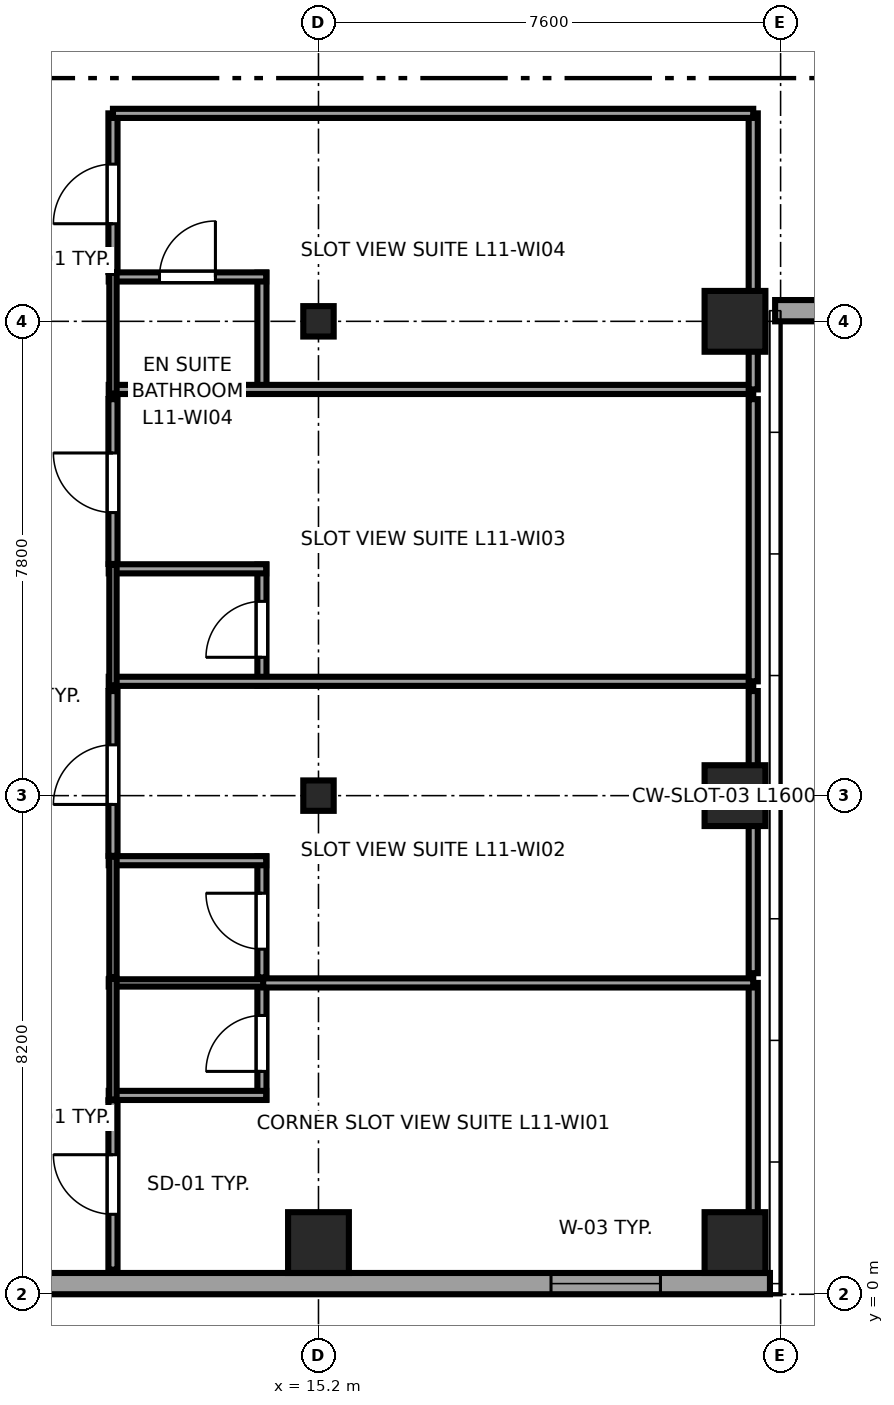
"""IFC4 building model, lengths in metres.
Left out: names, types, materials, properties, quantities, classifications, styles, units other than length and angle.
Written with IfcOpenShell. Run it as: python <this file> out.ifc"""

import sys

from ifc_helpers import new_model, si_unit, direction, frame, frame_2d, origin, origin_2d, place, context, subcontext, project, spatial, rectangle, i_section, extrude, source, transform, mapped, element, fill, save


model = new_model("IFC4")
c1 = context("Model", 3, precision=1e-05, world=origin(), true_north=direction((0.0, 1.0)))
c2 = subcontext(c1, "Body", "Model", "MODEL_VIEW")
j1 = project(units=[si_unit("LENGTHUNIT", "METRE"), si_unit("PLANEANGLEUNIT", "RADIAN")], contexts=[c1])
p1 = place(None, origin())
s1 = spatial("IfcSite", under=j1, at=p1, CompositionType="ELEMENT")
p2 = place(p1, origin())
s2 = spatial("IfcBuilding", under=s1, at=p2, CompositionType="ELEMENT")
p3 = place(p2, frame((0.0, 0.0, 49.75)))
s3 = spatial("IfcBuildingStorey", under=s2, at=p3, CompositionType="ELEMENT", Elevation=49.75)
m1 = source(origin(), c2, "Body", "SweptSolid", [
    extrude(rectangle(XDim=1.0, YDim=1.0, at=origin_2d()), origin(), (0.0, 0.0, 1.0), 3.55),
])
p4 = place(p3, frame((15.2, 0.85, 0.0), z_axis=(0.0, 0.0, 1.0), x_axis=(1.0, 0.0, 0.0)))
e1 = element("IfcColumn", 1, at=p4, inside=s3, PredefinedType="COLUMN", context=c2, shape_type="MappedRepresentation", body=[
    mapped(m1, transform((0.0, 0.0, 0.0), x_axis=(1.0, 0.0, 0.0), y_axis=(0.0, 1.0, 0.0), z_axis=(0.0, 0.0, 1.0), scale=1.0)),
])
m2 = source(origin(), c2, "Body", "SweptSolid", [
    extrude(i_section(OverallWidth=0.5, OverallDepth=0.5, WebThickness=0.028, FlangeThickness=0.045, at=origin_2d()), origin(), (0.0, 0.0, 1.0), 3.55),
])
for number, where, z_axis, x_axis in (
    (2, (15.2, 8.2, 0.0), (0.0, 0.0, 1.0), (1.0, 0.0, 0.0)),
    (3, (15.2, 16.0, 0.0), (0.0, 0.0, 1.0), (1.0, 0.0, 0.0)),
):
    element("IfcColumn", number, at=place(p3, frame(where, z_axis=z_axis, x_axis=x_axis)), inside=s3, PredefinedType="COLUMN", context=c2, shape_type="MappedRepresentation", body=[
        mapped(m2, transform((0.0, 0.0, 0.0), x_axis=(1.0, 0.0, 0.0), y_axis=(0.0, 1.0, 0.0), z_axis=(0.0, 0.0, 1.0), scale=1.0)),
    ])
for number, where, z_axis, x_axis in (
    (4, (22.05, 0.85, 0.0), (0.0, 0.0, 1.0), (1.0, 0.0, 0.0)),
    (5, (22.05, 8.2, 0.0), (0.0, 0.0, 1.0), (1.0, 0.0, 0.0)),
    (6, (22.05, 16.0, 0.0), (0.0, 0.0, 1.0), (1.0, 0.0, 0.0)),
):
    element("IfcColumn", number, at=place(p3, frame(where, z_axis=z_axis, x_axis=x_axis)), inside=s3, PredefinedType="COLUMN", context=c2, shape_type="MappedRepresentation", body=[
        mapped(m1, transform((0.0, 0.0, 0.0), x_axis=(1.0, 0.0, 0.0), y_axis=(0.0, 1.0, 0.0), z_axis=(0.0, 0.0, 1.0), scale=1.0)),
    ])
p5 = place(p3, frame((4.617, 0.175, 0.0), z_axis=(0.0, 0.0, 1.0), x_axis=(1.0, 0.0, 0.0)))
e7 = element("IfcWall", 7, at=p5, inside=s3, PredefinedType="SOLIDWALL", context=c2, shape_type="SweptSolid", body=[
    extrude(rectangle(XDim=18.008, YDim=0.35, at=frame_2d((9.004, 0.0))), origin(), (0.0, 0.0, 1.0), 3.37),
])
p6 = place(p5, frame((14.407, 0.0, 0.68)))
e8 = element("IfcOpeningElement", 8, at=p6, cuts=e7, PredefinedType="OPENING", context=c2, shape_type="SweptSolid", body=[
    extrude(rectangle(XDim=1.8, YDim=1.85, at=frame_2d((0.9, 0.925))), frame((0.0, 0.185, 0.0), z_axis=(0.0, -1.0, 0.0), x_axis=(1.0, 0.0, 0.0)), (0.0, 0.0, 1.0), 0.37),
])
p7 = place(p3, frame((22.71, 16.175, 0.0), z_axis=(0.0, 0.0, 1.0), x_axis=(1.0, 0.0, 0.0)))
e9 = element("IfcWall", 9, at=p7, inside=s3, PredefinedType="SOLIDWALL", context=c2, shape_type="SweptSolid", body=[
    extrude(rectangle(XDim=11.58, YDim=0.35, at=frame_2d((5.79, 0.0))), origin(), (0.0, 0.0, 1.0), 2.748),
])
p8 = place(p7, frame((2.295, 0.0, 0.68)))
e10 = element("IfcOpeningElement", 10, at=p8, cuts=e9, PredefinedType="OPENING", context=c2, shape_type="SweptSolid", body=[
    extrude(rectangle(XDim=1.8, YDim=1.85, at=frame_2d((0.9, 0.925))), frame((0.0, 0.185, 0.0), z_axis=(0.0, -1.0, 0.0), x_axis=(1.0, 0.0, 0.0)), (0.0, 0.0, 1.0), 0.37),
])
p9 = place(p7, frame((7.485, 0.0, 0.68)))
e11 = element("IfcOpeningElement", 11, at=p9, cuts=e9, PredefinedType="OPENING", context=c2, shape_type="SweptSolid", body=[
    extrude(rectangle(XDim=1.8, YDim=1.85, at=frame_2d((0.9, 0.925))), frame((0.0, 0.185, 0.0), z_axis=(0.0, -1.0, 0.0), x_axis=(1.0, 0.0, 0.0)), (0.0, 0.0, 1.0), 0.37),
])
p10 = place(p3, frame((14.27, 3.2, 0.0), z_axis=(0.0, 0.0, 1.0), x_axis=(0.0, 1.0, 0.0)))
e12 = element("IfcWall", 12, at=p10, inside=s3, PredefinedType="PARTITIONING", context=c2, shape_type="SweptSolid", body=[
    extrude(rectangle(XDim=1.99, YDim=0.15, at=frame_2d((0.995, 0.0))), origin(), (0.0, 0.0, 1.0), 3.37),
])
p11 = place(p10, frame((0.465, 0.0, 0.0)))
e13 = element("IfcOpeningElement", 13, at=p11, cuts=e12, PredefinedType="OPENING", context=c2, shape_type="SweptSolid", body=[
    extrude(rectangle(XDim=0.92, YDim=2.01, at=frame_2d((0.46, 1.005))), frame((0.0, 0.085, 0.0), z_axis=(0.0, -1.0, 0.0), x_axis=(1.0, 0.0, 0.0)), (0.0, 0.0, 1.0), 0.17),
])
p12 = place(p3, frame((11.75, 3.27, 0.0), z_axis=(0.0, 0.0, 1.0), x_axis=(1.0, 0.0, 0.0)))
e14 = element("IfcWall", 14, at=p12, inside=s3, PredefinedType="PARTITIONING", context=c2, shape_type="SweptSolid", body=[
    extrude(rectangle(XDim=2.59, YDim=0.15, at=frame_2d((1.295, 0.0))), origin(), (0.0, 0.0, 1.0), 3.37),
])
p13 = place(p3, frame((11.75, 5.12, 0.0), z_axis=(0.0, 0.0, 1.0), x_axis=(1.0, 0.0, 0.0)))
e15 = element("IfcWall", 15, at=p13, inside=s3, PredefinedType="PLUMBINGWALL", context=c2, shape_type="SweptSolid", body=[
    extrude(rectangle(XDim=2.59, YDim=0.12, at=frame_2d((1.295, 0.0))), origin(), (0.0, 0.0, 1.0), 3.37),
])
p14 = place(p3, frame((11.82, 3.2, 0.0), z_axis=(0.0, 0.0, 1.0), x_axis=(0.0, 1.0, 0.0)))
e16 = element("IfcWall", 16, at=p14, inside=s3, PredefinedType="PLUMBINGWALL", context=c2, shape_type="SweptSolid", body=[
    extrude(rectangle(XDim=1.99, YDim=0.12, at=frame_2d((0.995, 0.0))), origin(), (0.0, 0.0, 1.0), 3.37),
])
p15 = place(p3, frame((14.27, 5.21, 0.0), z_axis=(0.0, 0.0, 1.0), x_axis=(0.0, 1.0, 0.0)))
e17 = element("IfcWall", 17, at=p15, inside=s3, PredefinedType="PARTITIONING", context=c2, shape_type="SweptSolid", body=[
    extrude(rectangle(XDim=1.99, YDim=0.15, at=frame_2d((0.995, 0.0))), origin(), (0.0, 0.0, 1.0), 3.37),
])
p16 = place(p15, frame((0.465, 0.0, 0.0)))
e18 = element("IfcOpeningElement", 18, at=p16, cuts=e17, PredefinedType="OPENING", context=c2, shape_type="SweptSolid", body=[
    extrude(rectangle(XDim=0.92, YDim=2.01, at=frame_2d((0.46, 1.005))), frame((0.0, 0.085, 0.0), z_axis=(0.0, -1.0, 0.0), x_axis=(1.0, 0.0, 0.0)), (0.0, 0.0, 1.0), 0.17),
])
p17 = place(p3, frame((11.75, 7.13, 0.0), z_axis=(0.0, 0.0, 1.0), x_axis=(1.0, 0.0, 0.0)))
e19 = element("IfcWall", 19, at=p17, inside=s3, PredefinedType="PARTITIONING", context=c2, shape_type="SweptSolid", body=[
    extrude(rectangle(XDim=2.59, YDim=0.15, at=frame_2d((1.295, 0.0))), origin(), (0.0, 0.0, 1.0), 3.37),
])
p18 = place(p3, frame((11.82, 5.21, 0.0), z_axis=(0.0, 0.0, 1.0), x_axis=(0.0, 1.0, 0.0)))
e20 = element("IfcWall", 20, at=p18, inside=s3, PredefinedType="PLUMBINGWALL", context=c2, shape_type="SweptSolid", body=[
    extrude(rectangle(XDim=1.99, YDim=0.12, at=frame_2d((0.995, 0.0))), origin(), (0.0, 0.0, 1.0), 3.37),
])
p19 = place(p3, frame((14.27, 10.01, 0.0), z_axis=(0.0, 0.0, 1.0), x_axis=(0.0, 1.0, 0.0)))
e21 = element("IfcWall", 21, at=p19, inside=s3, PredefinedType="PARTITIONING", context=c2, shape_type="SweptSolid", body=[
    extrude(rectangle(XDim=1.99, YDim=0.15, at=frame_2d((0.995, 0.0))), origin(), (0.0, 0.0, 1.0), 3.37),
])
p20 = place(p19, frame((0.465, 0.0, 0.0)))
e22 = element("IfcOpeningElement", 22, at=p20, cuts=e21, PredefinedType="OPENING", context=c2, shape_type="SweptSolid", body=[
    extrude(rectangle(XDim=0.92, YDim=2.01, at=frame_2d((0.46, 1.005))), frame((0.0, 0.085, 0.0), z_axis=(0.0, -1.0, 0.0), x_axis=(1.0, 0.0, 0.0)), (0.0, 0.0, 1.0), 0.17),
])
p21 = place(p3, frame((11.75, 10.08, 0.0), z_axis=(0.0, 0.0, 1.0), x_axis=(1.0, 0.0, 0.0)))
e23 = element("IfcWall", 23, at=p21, inside=s3, PredefinedType="PARTITIONING", context=c2, shape_type="SweptSolid", body=[
    extrude(rectangle(XDim=10.6, YDim=0.15, at=frame_2d((5.3, 0.0))), origin(), (0.0, 0.0, 1.0), 3.37),
])
p22 = place(p3, frame((11.75, 11.93, 0.0), z_axis=(0.0, 0.0, 1.0), x_axis=(1.0, 0.0, 0.0)))
e24 = element("IfcWall", 24, at=p22, inside=s3, PredefinedType="PARTITIONING", context=c2, shape_type="SweptSolid", body=[
    extrude(rectangle(XDim=2.59, YDim=0.15, at=frame_2d((1.295, 0.0))), origin(), (0.0, 0.0, 1.0), 3.37),
])
p23 = place(p3, frame((11.82, 10.01, 0.0), z_axis=(0.0, 0.0, 1.0), x_axis=(0.0, 1.0, 0.0)))
e25 = element("IfcWall", 25, at=p23, inside=s3, PredefinedType="PLUMBINGWALL", context=c2, shape_type="SweptSolid", body=[
    extrude(rectangle(XDim=1.99, YDim=0.12, at=frame_2d((0.995, 0.0))), origin(), (0.0, 0.0, 1.0), 3.37),
])
p24 = place(p3, frame((14.27, 14.81, 0.0), z_axis=(0.0, 0.0, 1.0), x_axis=(0.0, 1.0, 0.0)))
e26 = element("IfcWall", 26, at=p24, inside=s3, PredefinedType="PARTITIONING", context=c2, shape_type="SweptSolid", body=[
    extrude(rectangle(XDim=1.99, YDim=0.15, at=frame_2d((0.995, 0.0))), origin(), (0.0, 0.0, 1.0), 3.37),
])
p25 = place(p3, frame((11.75, 14.88, 0.0), z_axis=(0.0, 0.0, 1.0), x_axis=(1.0, 0.0, 0.0)))
e27 = element("IfcWall", 27, at=p25, inside=s3, PredefinedType="PARTITIONING", context=c2, shape_type="SweptSolid", body=[
    extrude(rectangle(XDim=10.6, YDim=0.15, at=frame_2d((5.3, 0.0))), origin(), (0.0, 0.0, 1.0), 3.37),
])
p26 = place(p3, frame((11.75, 16.73, 0.0), z_axis=(0.0, 0.0, 1.0), x_axis=(1.0, 0.0, 0.0)))
e28 = element("IfcWall", 28, at=p26, inside=s3, PredefinedType="PARTITIONING", context=c2, shape_type="SweptSolid", body=[
    extrude(rectangle(XDim=2.59, YDim=0.15, at=frame_2d((1.295, 0.0))), origin(), (0.0, 0.0, 1.0), 3.37),
])
p27 = place(p26, frame((0.835, 0.0, 0.0)))
e29 = element("IfcOpeningElement", 29, at=p27, cuts=e28, PredefinedType="OPENING", context=c2, shape_type="SweptSolid", body=[
    extrude(rectangle(XDim=0.92, YDim=2.01, at=frame_2d((0.46, 1.005))), frame((0.0, 0.085, 0.0), z_axis=(0.0, -1.0, 0.0), x_axis=(1.0, 0.0, 0.0)), (0.0, 0.0, 1.0), 0.17),
])
p28 = place(p3, frame((11.82, 14.81, 0.0), z_axis=(0.0, 0.0, 1.0), x_axis=(0.0, 1.0, 0.0)))
e30 = element("IfcWall", 30, at=p28, inside=s3, PredefinedType="PLUMBINGWALL", context=c2, shape_type="SweptSolid", body=[
    extrude(rectangle(XDim=1.99, YDim=0.12, at=frame_2d((0.995, 0.0))), origin(), (0.0, 0.0, 1.0), 3.37),
])
p29 = place(p3, frame((11.82, 0.405, 0.0), z_axis=(0.0, 0.0, 1.0), x_axis=(0.0, 1.0, 0.0)))
e31 = element("IfcWall", 31, at=p29, inside=s3, PredefinedType="PARTITIONING", context=c2, shape_type="SweptSolid", body=[
    extrude(rectangle(XDim=2.785, YDim=0.15, at=frame_2d((1.393, 0.0))), origin(), (0.0, 0.0, 1.0), 3.37),
])
p30 = place(p29, frame((0.91, 0.0, 0.0)))
e32 = element("IfcOpeningElement", 32, at=p30, cuts=e31, PredefinedType="OPENING", context=c2, shape_type="SweptSolid", body=[
    extrude(rectangle(XDim=0.98, YDim=2.12, at=frame_2d((0.49, 1.06))), frame((0.0, 0.085, 0.0), z_axis=(0.0, -1.0, 0.0), x_axis=(1.0, 0.0, 0.0)), (0.0, 0.0, 1.0), 0.17),
])
p31 = place(p3, frame((22.35, 0.405, 0.0), z_axis=(0.0, 0.0, 1.0), x_axis=(0.0, 1.0, 0.0)))
e33 = element("IfcWall", 33, at=p31, inside=s3, PredefinedType="PARTITIONING", context=c2, shape_type="SweptSolid", body=[
    extrude(rectangle(XDim=4.715, YDim=0.15, at=frame_2d((2.357, 0.0))), origin(), (0.0, 0.0, 1.0), 3.37),
])
p32 = place(p3, frame((14.29, 5.12, 0.0), z_axis=(0.0, 0.0, 1.0), x_axis=(1.0, 0.0, 0.0)))
e34 = element("IfcWall", 34, at=p32, inside=s3, PredefinedType="PARTITIONING", context=c2, shape_type="SweptSolid", body=[
    extrude(rectangle(XDim=8.06, YDim=0.15, at=frame_2d((4.03, 0.0))), origin(), (0.0, 0.0, 1.0), 3.37),
])
p33 = place(p3, frame((11.82, 7.21, 0.0), z_axis=(0.0, 0.0, 1.0), x_axis=(0.0, 1.0, 0.0)))
e35 = element("IfcWall", 35, at=p33, inside=s3, PredefinedType="PARTITIONING", context=c2, shape_type="SweptSolid", body=[
    extrude(rectangle(XDim=2.71, YDim=0.15, at=frame_2d((1.355, 0.0))), origin(), (0.0, 0.0, 1.0), 3.37),
])
p34 = place(p33, frame((0.845, 0.0, 0.0)))
e36 = element("IfcOpeningElement", 36, at=p34, cuts=e35, PredefinedType="OPENING", context=c2, shape_type="SweptSolid", body=[
    extrude(rectangle(XDim=0.98, YDim=2.12, at=frame_2d((0.49, 1.06))), frame((0.0, 0.085, 0.0), z_axis=(0.0, -1.0, 0.0), x_axis=(1.0, 0.0, 0.0)), (0.0, 0.0, 1.0), 0.17),
])
p35 = place(p3, frame((22.35, 5.28, 0.0), z_axis=(0.0, 0.0, 1.0), x_axis=(0.0, 1.0, 0.0)))
e37 = element("IfcWall", 37, at=p35, inside=s3, PredefinedType="PARTITIONING", context=c2, shape_type="SweptSolid", body=[
    extrude(rectangle(XDim=4.64, YDim=0.15, at=frame_2d((2.32, 0.0))), origin(), (0.0, 0.0, 1.0), 3.37),
])
p36 = place(p3, frame((11.82, 12.01, 0.0), z_axis=(0.0, 0.0, 1.0), x_axis=(0.0, 1.0, 0.0)))
e38 = element("IfcWall", 38, at=p36, inside=s3, PredefinedType="PARTITIONING", context=c2, shape_type="SweptSolid", body=[
    extrude(rectangle(XDim=2.71, YDim=0.15, at=frame_2d((1.355, 0.0))), origin(), (0.0, 0.0, 1.0), 3.37),
])
p37 = place(p36, frame((0.845, 0.0, 0.0)))
e39 = element("IfcOpeningElement", 39, at=p37, cuts=e38, PredefinedType="OPENING", context=c2, shape_type="SweptSolid", body=[
    extrude(rectangle(XDim=0.98, YDim=2.12, at=frame_2d((0.49, 1.06))), frame((0.0, 0.085, 0.0), z_axis=(0.0, -1.0, 0.0), x_axis=(1.0, 0.0, 0.0)), (0.0, 0.0, 1.0), 0.17),
])
p38 = place(p3, frame((22.35, 10.08, 0.0), z_axis=(0.0, 0.0, 1.0), x_axis=(0.0, 1.0, 0.0)))
e40 = element("IfcWall", 40, at=p38, inside=s3, PredefinedType="PARTITIONING", context=c2, shape_type="SweptSolid", body=[
    extrude(rectangle(XDim=4.64, YDim=0.15, at=frame_2d((2.32, 0.0))), origin(), (0.0, 0.0, 1.0), 3.37),
])
p39 = place(p3, frame((11.82, 16.81, 0.0), z_axis=(0.0, 0.0, 1.0), x_axis=(0.0, 1.0, 0.0)))
e41 = element("IfcWall", 41, at=p39, inside=s3, PredefinedType="PARTITIONING", context=c2, shape_type="SweptSolid", body=[
    extrude(rectangle(XDim=2.61, YDim=0.15, at=frame_2d((1.305, 0.0))), origin(), (0.0, 0.0, 1.0), 3.37),
])
p40 = place(p39, frame((0.795, 0.0, 0.0)))
e42 = element("IfcOpeningElement", 42, at=p40, cuts=e41, PredefinedType="OPENING", context=c2, shape_type="SweptSolid", body=[
    extrude(rectangle(XDim=0.98, YDim=2.12, at=frame_2d((0.49, 1.06))), frame((0.0, 0.085, 0.0), z_axis=(0.0, -1.0, 0.0), x_axis=(1.0, 0.0, 0.0)), (0.0, 0.0, 1.0), 0.17),
])
p41 = place(p3, frame((22.35, 14.88, 0.0), z_axis=(0.0, 0.0, 1.0), x_axis=(0.0, 1.0, 0.0)))
e43 = element("IfcWall", 43, at=p41, inside=s3, PredefinedType="PARTITIONING", context=c2, shape_type="SweptSolid", body=[
    extrude(rectangle(XDim=4.54, YDim=0.15, at=frame_2d((2.27, 0.0))), origin(), (0.0, 0.0, 1.0), 3.37),
])
p42 = place(p3, frame((11.82, 19.42, 0.0), z_axis=(0.0, 0.0, 1.0), x_axis=(1.0, 0.0, 0.0)))
e44 = element("IfcWall", 44, at=p42, inside=s3, PredefinedType="PARTITIONING", context=c2, shape_type="SweptSolid", body=[
    extrude(rectangle(XDim=10.53, YDim=0.15, at=frame_2d((5.265, 0.0))), origin(), (0.0, 0.0, 1.0), 3.37),
])
m3 = source(origin(), c2, "Body", "SweptSolid", [
    extrude(rectangle(XDim=1.8, YDim=1.85, at=frame_2d((0.9, 0.925))), frame((0.0, 0.09, 0.0), z_axis=(0.0, -1.0, 0.0), x_axis=(1.0, 0.0, 0.0)), (0.0, 0.0, 1.0), 0.06),
])
p43 = place(p6, origin())
e45 = element("IfcWindow", 45, at=p43, inside=s3, PartitioningType="TRIPLE_PANEL_HORIZONTAL", PredefinedType="WINDOW", context=c2, shape_type="MappedRepresentation", body=[
    mapped(m3, transform((0.0, 0.0, 0.0), x_axis=(1.0, 0.0, 0.0), y_axis=(0.0, 1.0, 0.0), z_axis=(0.0, 0.0, 1.0), scale=1.0)),
])
fill(e8, e45)
m4 = source(origin(), c2, "Body", "SweptSolid", [
    extrude(rectangle(XDim=0.92, YDim=2.01, at=frame_2d((0.46, 1.005))), frame((0.0, 0.025, 0.0), z_axis=(0.0, -1.0, 0.0), x_axis=(1.0, 0.0, 0.0)), (0.0, 0.0, 1.0), 0.05),
])
p44 = place(p11, origin())
e46 = element("IfcDoor", 46, at=p44, inside=s3, OperationType="SINGLE_SWING_LEFT", PredefinedType="DOOR", context=c2, shape_type="MappedRepresentation", body=[
    mapped(m4, transform((0.0, 0.0, 0.0), x_axis=(1.0, 0.0, 0.0), y_axis=(0.0, 1.0, 0.0), z_axis=(0.0, 0.0, 1.0), scale=1.0)),
])
fill(e13, e46)
p45 = place(p16, origin())
e47 = element("IfcDoor", 47, at=p45, inside=s3, OperationType="SINGLE_SWING_RIGHT", PredefinedType="DOOR", context=c2, shape_type="MappedRepresentation", body=[
    mapped(m4, transform((0.0, 0.0, 0.0), x_axis=(1.0, 0.0, 0.0), y_axis=(0.0, 1.0, 0.0), z_axis=(0.0, 0.0, 1.0), scale=1.0)),
])
fill(e18, e47)
p46 = place(p20, origin())
e48 = element("IfcDoor", 48, at=p46, inside=s3, OperationType="SINGLE_SWING_LEFT", PredefinedType="DOOR", context=c2, shape_type="MappedRepresentation", body=[
    mapped(m4, transform((0.0, 0.0, 0.0), x_axis=(1.0, 0.0, 0.0), y_axis=(0.0, 1.0, 0.0), z_axis=(0.0, 0.0, 1.0), scale=1.0)),
])
fill(e22, e48)
p47 = place(p27, origin())
e49 = element("IfcDoor", 49, at=p47, inside=s3, OperationType="SINGLE_SWING_RIGHT", PredefinedType="DOOR", context=c2, shape_type="MappedRepresentation", body=[
    mapped(m4, transform((0.0, 0.0, 0.0), x_axis=(1.0, 0.0, 0.0), y_axis=(0.0, 1.0, 0.0), z_axis=(0.0, 0.0, 1.0), scale=1.0)),
])
fill(e29, e49)
m5 = source(origin(), c2, "Body", "SweptSolid", [
    extrude(rectangle(XDim=0.98, YDim=2.12, at=frame_2d((0.49, 1.06))), frame((0.0, 0.025, 0.0), z_axis=(0.0, -1.0, 0.0), x_axis=(1.0, 0.0, 0.0)), (0.0, 0.0, 1.0), 0.05),
])
p48 = place(p30, origin())
e50 = element("IfcDoor", 50, at=p48, inside=s3, OperationType="SINGLE_SWING_RIGHT", PredefinedType="DOOR", context=c2, shape_type="MappedRepresentation", body=[
    mapped(m5, transform((0.0, 0.0, 0.0), x_axis=(1.0, 0.0, 0.0), y_axis=(0.0, 1.0, 0.0), z_axis=(0.0, 0.0, 1.0), scale=1.0)),
])
fill(e32, e50)
p49 = place(p34, origin())
e51 = element("IfcDoor", 51, at=p49, inside=s3, OperationType="SINGLE_SWING_LEFT", PredefinedType="DOOR", context=c2, shape_type="MappedRepresentation", body=[
    mapped(m5, transform((0.0, 0.0, 0.0), x_axis=(1.0, 0.0, 0.0), y_axis=(0.0, 1.0, 0.0), z_axis=(0.0, 0.0, 1.0), scale=1.0)),
])
fill(e36, e51)
p50 = place(p37, origin())
e52 = element("IfcDoor", 52, at=p50, inside=s3, OperationType="SINGLE_SWING_RIGHT", PredefinedType="DOOR", context=c2, shape_type="MappedRepresentation", body=[
    mapped(m5, transform((0.0, 0.0, 0.0), x_axis=(1.0, 0.0, 0.0), y_axis=(0.0, 1.0, 0.0), z_axis=(0.0, 0.0, 1.0), scale=1.0)),
])
fill(e39, e52)
p51 = place(p40, origin())
e53 = element("IfcDoor", 53, at=p51, inside=s3, OperationType="SINGLE_SWING_LEFT", PredefinedType="DOOR", context=c2, shape_type="MappedRepresentation", body=[
    mapped(m5, transform((0.0, 0.0, 0.0), x_axis=(1.0, 0.0, 0.0), y_axis=(0.0, 1.0, 0.0), z_axis=(0.0, 0.0, 1.0), scale=1.0)),
])
fill(e42, e53)
save(model, sys.argv[1])
